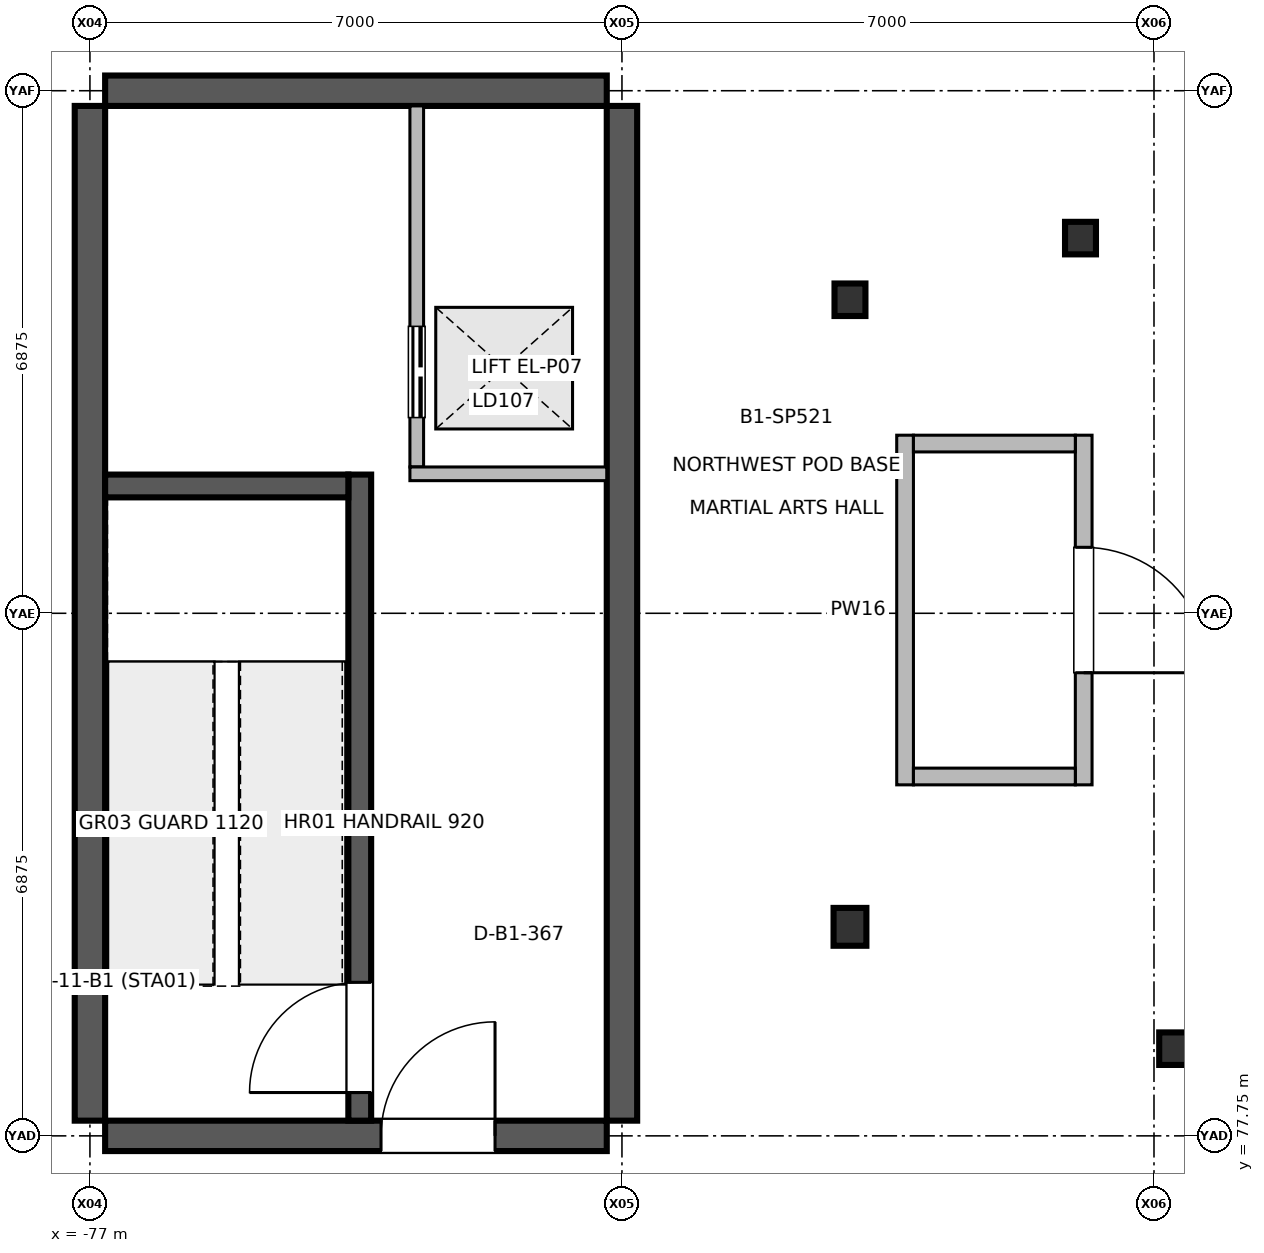
"""IFC4 building model, lengths in metres.
Left out: names, types, materials, properties, quantities, classifications, styles, units other than length and angle.
Written with IfcOpenShell. Run it as: python <this file> out.ifc"""

import sys

from ifc_helpers import new_model, si_unit, direction, frame, frame_2d, origin, origin_2d, place, context, subcontext, project, spatial, rectangle, i_section, extrude, element, fill, save


model = new_model("IFC4")
c1 = context("Model", 3, precision=1e-05, world=origin(), true_north=direction((0.0, 1.0)))
c2 = subcontext(c1, "Body", "Model", "MODEL_VIEW")
j1 = project(units=[si_unit("LENGTHUNIT", "METRE"), si_unit("PLANEANGLEUNIT", "RADIAN")], contexts=[c1])
p1 = place(None, origin())
s1 = spatial("IfcSite", under=j1, at=p1, CompositionType="ELEMENT")
p2 = place(p1, origin())
s2 = spatial("IfcBuilding", under=s1, at=p2, CompositionType="ELEMENT")
p3 = place(p2, frame((0.0, 0.0, -6.0)))
s3 = spatial("IfcBuildingStorey", under=s2, at=p3, CompositionType="ELEMENT", Elevation=-6.0)
p4 = place(p3, frame((-67.0, 80.5, 0.0), z_axis=(0.0, 0.0, 1.0), x_axis=(1.0, 0.0, 0.0)))
e1 = element("IfcColumn", 1, at=p4, inside=s3, PredefinedType="COLUMN", context=c2, shape_type="SweptSolid", body=[
    extrude(i_section(OverallWidth=0.432, OverallDepth=0.498, WebThickness=0.024, FlangeThickness=0.038, at=origin_2d()), origin(), (0.0, 0.0, 1.0), 5.998),
])
p5 = place(p3, frame((-67.0, 88.75, 0.0), z_axis=(0.0, 0.0, 1.0), x_axis=(1.0, 0.0, 0.0)))
e2 = element("IfcColumn", 2, at=p5, inside=s3, PredefinedType="COLUMN", context=c2, shape_type="SweptSolid", body=[
    extrude(i_section(OverallWidth=0.407, OverallDepth=0.428, WebThickness=0.02, FlangeThickness=0.035, at=origin_2d()), origin(), (0.0, 0.0, 1.0), 5.998),
])
for number, where, z_axis, x_axis in (
    (3, (-62.728, 78.897, 0.0), (0.0, 0.0, 1.0), (1.0, 0.0, 0.0)),
    (4, (-63.967, 89.561, 0.0), (0.0, 0.0, 1.0), (1.0, 0.0, 0.0)),
):
    element("IfcColumn", number, at=place(p3, frame(where, z_axis=z_axis, x_axis=x_axis)), inside=s3, PredefinedType="COLUMN", context=c2, shape_type="SweptSolid", body=[
        extrude(i_section(OverallWidth=0.407, OverallDepth=0.428, WebThickness=0.02, FlangeThickness=0.035, at=origin_2d()), origin(), (0.0, 0.0, 1.0), 5.718),
    ])
for number, where, z_axis, x_axis in (
    (5, (-77.0, 77.95, 0.0), (0.0, 0.0, 1.0), (0.0, 1.0, 0.0)),
    (6, (-70.0, 77.95, 0.0), (0.0, 0.0, 1.0), (0.0, 1.0, 0.0)),
):
    element("IfcWall", number, at=place(p3, frame(where, z_axis=z_axis, x_axis=x_axis)), inside=s3, PredefinedType="SHEAR", context=c2, shape_type="SweptSolid", body=[
        extrude(rectangle(XDim=13.35, YDim=0.4, at=frame_2d((6.675, 0.0))), origin(), (0.0, 0.0, 1.0), 5.72),
    ])
p6 = place(p3, frame((-76.8, 77.75, 0.0), z_axis=(0.0, 0.0, 1.0), x_axis=(1.0, 0.0, 0.0)))
e7 = element("IfcWall", 7, at=p6, inside=s3, PredefinedType="SHEAR", context=c2, shape_type="SweptSolid", body=[
    extrude(rectangle(XDim=6.6, YDim=0.4, at=frame_2d((3.3, 0.0))), origin(), (0.0, 0.0, 1.0), 5.72),
])
p7 = place(p6, frame((3.63, 0.0, 0.0)))
e8 = element("IfcOpeningElement", 8, at=p7, cuts=e7, PredefinedType="OPENING", context=c2, shape_type="SweptSolid", body=[
    extrude(rectangle(XDim=1.5, YDim=2.2, at=frame_2d((0.75, 1.1))), frame((0.0, 0.21, 0.0), z_axis=(0.0, -1.0, 0.0), x_axis=(1.0, 0.0, 0.0)), (0.0, 0.0, 1.0), 0.42),
])
p8 = place(p3, frame((-76.8, 91.5, 0.0), z_axis=(0.0, 0.0, 1.0), x_axis=(1.0, 0.0, 0.0)))
e9 = element("IfcWall", 9, at=p8, inside=s3, PredefinedType="SHEAR", context=c2, shape_type="SweptSolid", body=[
    extrude(rectangle(XDim=6.6, YDim=0.4, at=frame_2d((3.3, 0.0))), origin(), (0.0, 0.0, 1.0), 5.72),
])
p9 = place(p3, frame((-73.45, 77.95, 0.0), z_axis=(0.0, 0.0, 1.0), x_axis=(0.0, 1.0, 0.0)))
e10 = element("IfcWall", 10, at=p9, inside=s3, PredefinedType="SHEAR", context=c2, shape_type="SweptSolid", body=[
    extrude(rectangle(XDim=8.5, YDim=0.3, at=frame_2d((4.25, 0.0))), origin(), (0.0, 0.0, 1.0), 5.72),
])
p10 = place(p9, frame((0.37, 0.0, 0.0)))
e11 = element("IfcOpeningElement", 11, at=p10, cuts=e10, PredefinedType="OPENING", context=c2, shape_type="SweptSolid", body=[
    extrude(rectangle(XDim=1.45, YDim=2.2, at=frame_2d((0.725, 1.1))), frame((0.0, 0.16, 0.0), z_axis=(0.0, -1.0, 0.0), x_axis=(1.0, 0.0, 0.0)), (0.0, 0.0, 1.0), 0.32),
])
p11 = place(p3, frame((-72.7, 86.55, 0.0), z_axis=(0.0, 0.0, 1.0), x_axis=(0.0, 1.0, 0.0)))
e12 = element("IfcWall", 12, at=p11, inside=s3, PredefinedType="PARTITIONING", context=c2, shape_type="SweptSolid", body=[
    extrude(rectangle(XDim=4.75, YDim=0.18, at=frame_2d((2.375, 0.0))), origin(), (0.0, 0.0, 1.0), 5.02),
])
p12 = place(p11, frame((0.65, 0.0, 0.0)))
e13 = element("IfcOpeningElement", 13, at=p12, cuts=e12, PredefinedType="OPENING", context=c2, shape_type="SweptSolid", body=[
    extrude(rectangle(XDim=1.2, YDim=2.25, at=frame_2d((0.6, 1.125))), frame((0.0, 0.1, 0.0), z_axis=(0.0, -1.0, 0.0), x_axis=(1.0, 0.0, 0.0)), (0.0, 0.0, 1.0), 0.2),
])
p13 = place(p3, frame((-63.925, 86.968, 0.0), z_axis=(0.0, 0.0, 1.0), x_axis=(0.0, -1.0, 0.0)))
e14 = element("IfcWall", 14, at=p13, inside=s3, PredefinedType="PARTITIONING", context=c2, shape_type="SweptSolid", body=[
    extrude(rectangle(XDim=4.6, YDim=0.22, at=frame_2d((2.3, 0.0))), origin(), (0.0, 0.0, 1.0), 5.02),
])
p14 = place(p13, frame((1.475, 0.0, 0.0)))
e15 = element("IfcOpeningElement", 15, at=p14, cuts=e14, PredefinedType="OPENING", context=c2, shape_type="SweptSolid", body=[
    extrude(rectangle(XDim=1.65, YDim=2.3, at=frame_2d((0.825, 1.15))), frame((0.0, 0.12, 0.0), z_axis=(0.0, -1.0, 0.0), x_axis=(1.0, 0.0, 0.0)), (0.0, 0.0, 1.0), 0.24),
])
p15 = place(p3, frame((-72.79, 86.46, 0.0), z_axis=(0.0, 0.0, 1.0), x_axis=(1.0, 0.0, 0.0)))
e16 = element("IfcWall", 16, at=p15, inside=s3, PredefinedType="PARTITIONING", context=c2, shape_type="SweptSolid", body=[
    extrude(rectangle(XDim=2.59, YDim=0.18, at=frame_2d((1.295, 0.0))), origin(), (0.0, 0.0, 1.0), 5.02),
])
p16 = place(p3, frame((-66.275, 82.368, 0.0), z_axis=(0.0, 0.0, 1.0), x_axis=(0.0, 1.0, 0.0)))
e17 = element("IfcWall", 17, at=p16, inside=s3, PredefinedType="PARTITIONING", context=c2, shape_type="SweptSolid", body=[
    extrude(rectangle(XDim=4.6, YDim=0.22, at=frame_2d((2.3, 0.0))), origin(), (0.0, 0.0, 1.0), 5.02),
])
for number, where, z_axis, x_axis in (
    (18, (-66.165, 82.478, 0.0), (0.0, 0.0, 1.0), (1.0, 0.0, 0.0)),
    (19, (-66.165, 86.858, 0.0), (0.0, 0.0, 1.0), (1.0, 0.0, 0.0)),
):
    element("IfcWall", number, at=place(p3, frame(where, z_axis=z_axis, x_axis=x_axis)), inside=s3, PredefinedType="PARTITIONING", context=c2, shape_type="SweptSolid", body=[
        extrude(rectangle(XDim=2.13, YDim=0.22, at=frame_2d((1.065, 0.0))), origin(), (0.0, 0.0, 1.0), 5.02),
    ])
p17 = place(p3, frame((-76.8, 86.3, 0.0), z_axis=(0.0, 0.0, 1.0), x_axis=(1.0, 0.0, 0.0)))
e20 = element("IfcWall", 20, at=p17, inside=s3, PredefinedType="SHEAR", context=c2, shape_type="SweptSolid", body=[
    extrude(rectangle(XDim=3.2, YDim=0.3, at=frame_2d((1.6, 0.0))), origin(), (0.0, 0.0, 1.0), 5.72),
])
p18 = place(p7, origin())
e21 = element("IfcDoor", 21, at=p18, inside=s3, OperationType="SINGLE_SWING_RIGHT", PredefinedType="DOOR", context=c2, shape_type="SweptSolid", body=[
    extrude(rectangle(XDim=1.5, YDim=2.2, at=frame_2d((0.75, 1.1))), frame((0.0, 0.025, 0.0), z_axis=(0.0, -1.0, 0.0), x_axis=(1.0, 0.0, 0.0)), (0.0, 0.0, 1.0), 0.05),
])
fill(e8, e21)
p19 = place(p10, origin())
e22 = element("IfcDoor", 22, at=p19, inside=s3, OperationType="SINGLE_SWING_LEFT", PredefinedType="DOOR", context=c2, shape_type="SweptSolid", body=[
    extrude(rectangle(XDim=1.45, YDim=2.2, at=frame_2d((0.725, 1.1))), frame((0.0, 0.025, 0.0), z_axis=(0.0, -1.0, 0.0), x_axis=(1.0, 0.0, 0.0)), (0.0, 0.0, 1.0), 0.05),
])
fill(e11, e22)
p20 = place(p12, origin())
e23 = element("IfcDoor", 23, at=p20, inside=s3, OperationType="DOUBLE_DOOR_SLIDING", PredefinedType="DOOR", context=c2, shape_type="SweptSolid", body=[
    extrude(rectangle(XDim=1.2, YDim=2.25, at=frame_2d((0.6, 1.125))), frame((0.0, 0.025, 0.0), z_axis=(0.0, -1.0, 0.0), x_axis=(1.0, 0.0, 0.0)), (0.0, 0.0, 1.0), 0.05),
])
fill(e13, e23)
p21 = place(p14, origin())
e24 = element("IfcDoor", 24, at=p21, inside=s3, OperationType="SINGLE_SWING_RIGHT", PredefinedType="DOOR", context=c2, shape_type="SweptSolid", body=[
    extrude(rectangle(XDim=1.65, YDim=2.3, at=frame_2d((0.825, 1.15))), frame((0.0, 0.025, 0.0), z_axis=(0.0, -1.0, 0.0), x_axis=(1.0, 0.0, 0.0)), (0.0, 0.0, 1.0), 0.05),
])
fill(e15, e24)
save(model, sys.argv[1])
